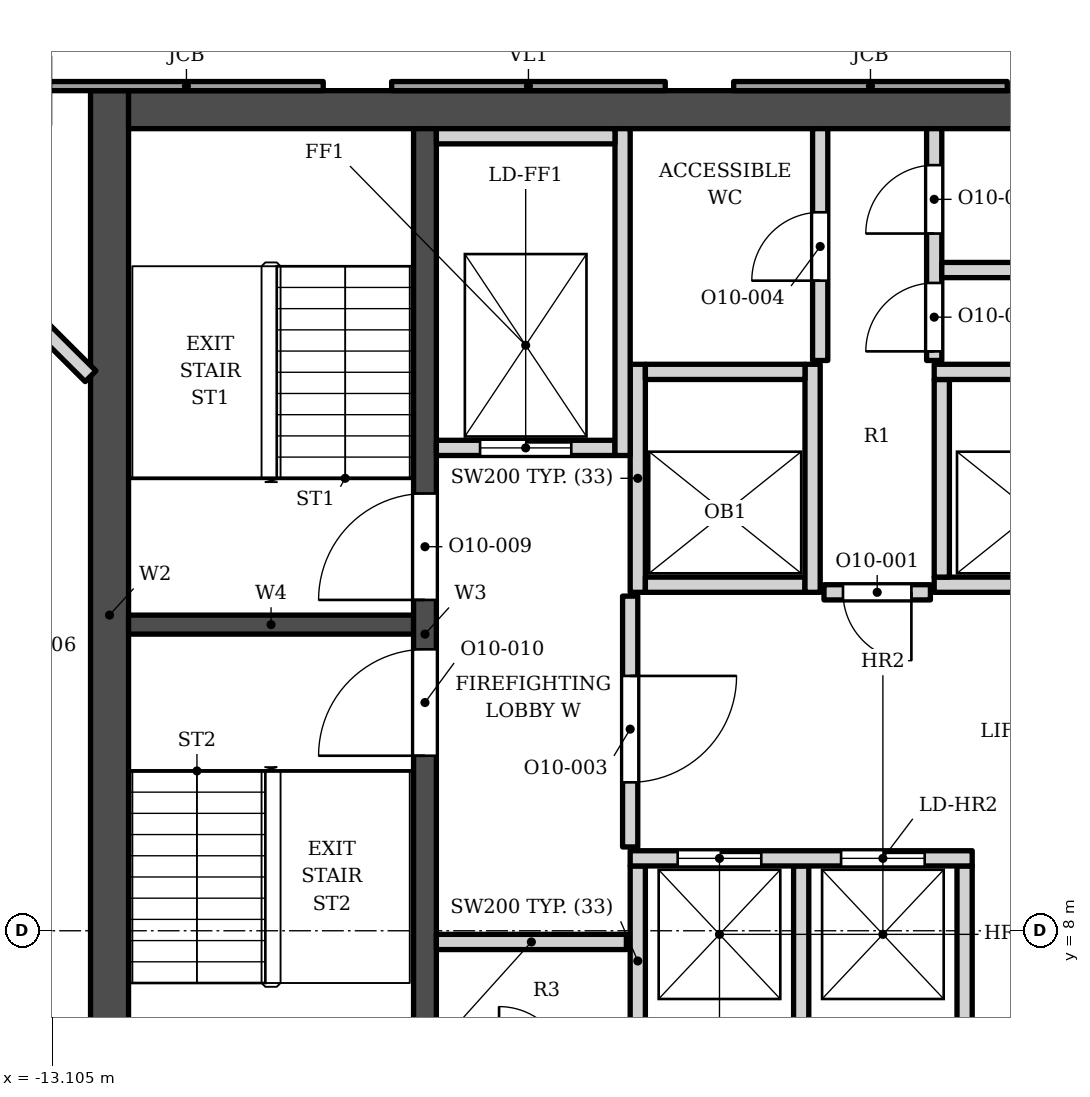
"""IFC4 building model, lengths in metres.
Left out: names, types, materials, properties, quantities, classifications, styles, units other than length and angle.
Written with IfcOpenShell. Run it as: python <this file> out.ifc"""

import sys

from ifc_helpers import new_model, si_unit, direction, frame, frame_2d, origin, place, context, subcontext, project, spatial, polyline, rectangle, outline, extrude, element, fill, save


model = new_model("IFC4")
c1 = context("Model", 3, precision=1e-05, world=origin(), true_north=direction((0.0, 1.0)))
c2 = subcontext(c1, "Body", "Model", "MODEL_VIEW")
j1 = project(units=[si_unit("LENGTHUNIT", "METRE"), si_unit("PLANEANGLEUNIT", "RADIAN")], contexts=[c1])
p1 = place(None, origin())
s1 = spatial("IfcSite", under=j1, at=p1, CompositionType="ELEMENT")
p2 = place(p1, origin())
s2 = spatial("IfcBuilding", under=s1, at=p2, CompositionType="ELEMENT")
p3 = place(p2, frame((0.0, 0.0, 259.9)))
s3 = spatial("IfcBuildingStorey", under=s2, at=p3, CompositionType="ELEMENT", Elevation=259.9)
p4 = place(p3, frame((-12.1, 18.802, 0.0), z_axis=(0.0, 0.0, 1.0), x_axis=(1.0, 0.0, 0.0)))
e1 = element("IfcWall", 1, at=p4, inside=s3, PredefinedType="SHEAR", context=c2, shape_type="SweptSolid", body=[
    extrude(rectangle(XDim=24.2, YDim=0.5, at=frame_2d((12.1, 0.0))), origin(), (0.0, 0.0, 1.0), 3.9),
])
p5 = place(p3, frame((-12.35, 5.253, 0.0), z_axis=(0.0, 0.0, 1.0), x_axis=(0.0, 1.0, 0.0)))
e2 = element("IfcWall", 2, at=p5, inside=s3, PredefinedType="SHEAR", context=c2, shape_type="SweptSolid", body=[
    extrude(rectangle(XDim=13.8, YDim=0.5, at=frame_2d((6.9, 0.0))), origin(), (0.0, 0.0, 1.0), 3.9),
])
p6 = place(p3, frame((-8.2, 5.253, 0.0), z_axis=(0.0, 0.0, 1.0), x_axis=(0.0, 1.0, 0.0)))
e3 = element("IfcWall", 3, at=p6, inside=s3, PredefinedType="SHEAR", context=c2, shape_type="SweptSolid", body=[
    extrude(rectangle(XDim=13.3, YDim=0.3, at=frame_2d((6.65, 0.0))), origin(), (0.0, 0.0, 1.0), 3.9),
])
p7 = place(p6, frame((7.1, 0.0, 0.0)))
e4 = element("IfcOpeningElement", 4, at=p7, cuts=e3, PredefinedType="OPENING", context=c2, shape_type="SweptSolid", body=[
    extrude(rectangle(XDim=1.4, YDim=2.1, at=frame_2d((0.7, 1.05))), frame((0.0, 0.16, 0.0), z_axis=(0.0, -1.0, 0.0), x_axis=(1.0, 0.0, 0.0)), (0.0, 0.0, 1.0), 0.32),
])
p8 = place(p6, frame((5.05, 0.0, 0.0)))
e5 = element("IfcOpeningElement", 5, at=p8, cuts=e3, PredefinedType="OPENING", context=c2, shape_type="SweptSolid", body=[
    extrude(rectangle(XDim=1.4, YDim=2.1, at=frame_2d((0.7, 1.05))), frame((0.0, 0.16, 0.0), z_axis=(0.0, -1.0, 0.0), x_axis=(1.0, 0.0, 0.0)), (0.0, 0.0, 1.0), 0.32),
])
p9 = place(p3, frame((-12.1, 12.028, 0.0), z_axis=(0.0, 0.0, 1.0), x_axis=(1.0, 0.0, 0.0)))
e6 = element("IfcWall", 6, at=p9, inside=s3, PredefinedType="SHEAR", context=c2, shape_type="SweptSolid", body=[
    extrude(rectangle(XDim=3.75, YDim=0.25, at=frame_2d((1.875, 0.0))), origin(), (0.0, 0.0, 1.0), 3.9),
])
p10 = place(p3, origin())
e7 = element("IfcWall", 7, at=p10, inside=s3, PredefinedType="SOLIDWALL", context=c2, shape_type="SweptSolid", body=[
    extrude(outline(polyline([(-4.138, 19.173), (-4.138, 19.052), (-0.539, 19.052), (-0.539, 19.173), (-4.138, 19.173)])), origin(), (0.0, 0.0, 1.0), 3.0),
])
p11 = place(p3, origin())
e8 = element("IfcWall", 8, at=p11, inside=s3, PredefinedType="ELEMENTEDWALL", context=c2, shape_type="SweptSolid", body=[
    extrude(outline(polyline([(-8.638, 19.173), (-8.638, 19.052), (-5.039, 19.052), (-5.039, 19.173), (-8.638, 19.173)])), origin(), (0.0, 0.0, 1.0), 3.0),
])
p12 = place(p3, origin())
e9 = element("IfcWall", 9, at=p12, inside=s3, PredefinedType="SOLIDWALL", context=c2, shape_type="SweptSolid", body=[
    extrude(outline(polyline([(-13.138, 19.173), (-13.138, 19.052), (-9.539, 19.052), (-9.539, 19.173), (-13.138, 19.173)])), origin(), (0.0, 0.0, 1.0), 3.0),
])
for number, where, z_axis, x_axis in (
    (10, (-5.4, 6.353, 0.0), (0.0, 0.0, 1.0), (0.0, 1.0, 0.0)),
    (11, (-3.25, 6.353, 0.0), (0.0, 0.0, 1.0), (0.0, 1.0, 0.0)),
    (12, (-1.1, 6.353, 0.0), (0.0, 0.0, 1.0), (0.0, 1.0, 0.0)),
    (13, (-8.05, 7.853, 0.0), (0.0, 0.0, 1.0), (1.0, 0.0, 0.0)),
):
    element("IfcWall", number, at=place(p3, frame(where, z_axis=z_axis, x_axis=x_axis)), inside=s3, PredefinedType="SOLIDWALL", context=c2, shape_type="SweptSolid", body=[
        extrude(rectangle(XDim=2.5, YDim=0.2, at=frame_2d((1.25, 0.0))), origin(), (0.0, 0.0, 1.0), 3.73),
    ])
p13 = place(p3, frame((-5.5, 8.953, 0.0), z_axis=(0.0, 0.0, 1.0), x_axis=(1.0, 0.0, 0.0)))
e14 = element("IfcWall", 14, at=p13, inside=s3, PredefinedType="SOLIDWALL", context=c2, shape_type="SweptSolid", body=[
    extrude(rectangle(XDim=4.5, YDim=0.2, at=frame_2d((2.25, 0.0))), origin(), (0.0, 0.0, 1.0), 3.73),
])
p14 = place(p13, frame((0.625, 0.0, 0.0)))
e15 = element("IfcOpeningElement", 15, at=p14, cuts=e14, PredefinedType="OPENING", context=c2, shape_type="SweptSolid", body=[
    extrude(rectangle(XDim=1.1, YDim=2.1, at=frame_2d((0.55, 1.05))), frame((0.0, 0.11, 0.0), z_axis=(0.0, -1.0, 0.0), x_axis=(1.0, 0.0, 0.0)), (0.0, 0.0, 1.0), 0.22),
])
p15 = place(p13, frame((2.775, 0.0, 0.0)))
e16 = element("IfcOpeningElement", 16, at=p15, cuts=e14, PredefinedType="OPENING", context=c2, shape_type="SweptSolid", body=[
    extrude(rectangle(XDim=1.1, YDim=2.1, at=frame_2d((0.55, 1.05))), frame((0.0, 0.11, 0.0), z_axis=(0.0, -1.0, 0.0), x_axis=(1.0, 0.0, 0.0)), (0.0, 0.0, 1.0), 0.22),
])
p16 = place(p3, frame((-5.5, 9.103, 0.0), z_axis=(0.0, 0.0, 1.0), x_axis=(0.0, 1.0, 0.0)))
e17 = element("IfcWall", 17, at=p16, inside=s3, PredefinedType="SOLIDWALL", context=c2, shape_type="SweptSolid", body=[
    extrude(rectangle(XDim=3.3, YDim=0.2, at=frame_2d((1.65, 0.0))), origin(), (0.0, 0.0, 1.0), 3.73),
])
p17 = place(p16, frame((0.85, 0.0, 0.0)))
e18 = element("IfcOpeningElement", 18, at=p17, cuts=e17, PredefinedType="OPENING", context=c2, shape_type="SweptSolid", body=[
    extrude(rectangle(XDim=1.4, YDim=2.1, at=frame_2d((0.7, 1.05))), frame((0.0, 0.11, 0.0), z_axis=(0.0, -1.0, 0.0), x_axis=(1.0, 0.0, 0.0)), (0.0, 0.0, 1.0), 0.22),
])
p18 = place(p3, frame((-2.95, 12.453, 0.0), z_axis=(0.0, 0.0, 1.0), x_axis=(1.0, 0.0, 0.0)))
e19 = element("IfcWall", 19, at=p18, inside=s3, PredefinedType="SOLIDWALL", context=c2, shape_type="SweptSolid", body=[
    extrude(rectangle(XDim=1.4, YDim=0.2, at=frame_2d((0.7, 0.0))), origin(), (0.0, 0.0, 1.0), 3.73),
])
p19 = place(p18, frame((0.25, 0.0, 0.0)))
e20 = element("IfcOpeningElement", 20, at=p19, cuts=e19, PredefinedType="OPENING", context=c2, shape_type="SweptSolid", body=[
    extrude(rectangle(XDim=0.9, YDim=2.1, at=frame_2d((0.45, 1.05))), frame((0.0, 0.11, 0.0), z_axis=(0.0, -1.0, 0.0), x_axis=(1.0, 0.0, 0.0)), (0.0, 0.0, 1.0), 0.22),
])
p20 = place(p3, frame((-5.4, 12.453, 0.0), z_axis=(0.0, 0.0, 1.0), x_axis=(0.0, 1.0, 0.0)))
e21 = element("IfcWall", 21, at=p20, inside=s3, PredefinedType="SOLIDWALL", context=c2, shape_type="SweptSolid", body=[
    extrude(rectangle(XDim=3.0, YDim=0.2, at=frame_2d((1.5, 0.0))), origin(), (0.0, 0.0, 1.0), 3.73),
])
p21 = place(p3, frame((-5.3, 12.552, 0.0), z_axis=(0.0, 0.0, 1.0), x_axis=(1.0, 0.0, 0.0)))
e22 = element("IfcWall", 22, at=p21, inside=s3, PredefinedType="SOLIDWALL", context=c2, shape_type="SweptSolid", body=[
    extrude(rectangle(XDim=2.1, YDim=0.2, at=frame_2d((1.05, 0.0))), origin(), (0.0, 0.0, 1.0), 3.73),
])
p22 = place(p3, frame((-3.1, 12.453, 0.0), z_axis=(0.0, 0.0, 1.0), x_axis=(0.0, 1.0, 0.0)))
e23 = element("IfcWall", 23, at=p22, inside=s3, PredefinedType="SOLIDWALL", context=c2, shape_type="SweptSolid", body=[
    extrude(rectangle(XDim=3.0, YDim=0.2, at=frame_2d((1.5, 0.0))), origin(), (0.0, 0.0, 1.0), 3.73),
])
p23 = place(p3, frame((-1.5, 12.552, 0.0), z_axis=(0.0, 0.0, 1.0), x_axis=(1.0, 0.0, 0.0)))
e24 = element("IfcWall", 24, at=p23, inside=s3, PredefinedType="SOLIDWALL", context=c2, shape_type="SweptSolid", body=[
    extrude(rectangle(XDim=7.0, YDim=0.2, at=frame_2d((3.5, 0.0))), origin(), (0.0, 0.0, 1.0), 3.73),
])
p24 = place(p23, frame((3.075, 0.0, 0.0)))
e25 = element("IfcOpeningElement", 25, at=p24, cuts=e24, PredefinedType="OPENING", context=c2, shape_type="SweptSolid", body=[
    extrude(rectangle(XDim=1.1, YDim=2.1, at=frame_2d((0.55, 1.05))), frame((0.0, 0.11, 0.0), z_axis=(0.0, -1.0, 0.0), x_axis=(1.0, 0.0, 0.0)), (0.0, 0.0, 1.0), 0.22),
])
p25 = place(p23, frame((5.275, 0.0, 0.0)))
e26 = element("IfcOpeningElement", 26, at=p25, cuts=e24, PredefinedType="OPENING", context=c2, shape_type="SweptSolid", body=[
    extrude(rectangle(XDim=1.1, YDim=2.1, at=frame_2d((0.55, 1.05))), frame((0.0, 0.11, 0.0), z_axis=(0.0, -1.0, 0.0), x_axis=(1.0, 0.0, 0.0)), (0.0, 0.0, 1.0), 0.22),
])
p26 = place(p3, frame((-1.4, 12.653, 0.0), z_axis=(0.0, 0.0, 1.0), x_axis=(0.0, 1.0, 0.0)))
e27 = element("IfcWall", 27, at=p26, inside=s3, PredefinedType="SOLIDWALL", context=c2, shape_type="SweptSolid", body=[
    extrude(rectangle(XDim=2.6, YDim=0.2, at=frame_2d((1.3, 0.0))), origin(), (0.0, 0.0, 1.0), 3.73),
])
p27 = place(p3, frame((-8.05, 14.353, 0.0), z_axis=(0.0, 0.0, 1.0), x_axis=(1.0, 0.0, 0.0)))
e28 = element("IfcWall", 28, at=p27, inside=s3, PredefinedType="SOLIDWALL", context=c2, shape_type="SweptSolid", body=[
    extrude(rectangle(XDim=2.35, YDim=0.2, at=frame_2d((1.175, 0.0))), origin(), (0.0, 0.0, 1.0), 3.73),
])
p28 = place(p27, frame((0.575, 0.0, 0.0)))
e29 = element("IfcOpeningElement", 29, at=p28, cuts=e28, PredefinedType="OPENING", context=c2, shape_type="SweptSolid", body=[
    extrude(rectangle(XDim=1.2, YDim=2.1, at=frame_2d((0.6, 1.05))), frame((0.0, 0.11, 0.0), z_axis=(0.0, -1.0, 0.0), x_axis=(1.0, 0.0, 0.0)), (0.0, 0.0, 1.0), 0.22),
])
p29 = place(p3, frame((-5.6, 14.253, 0.0), z_axis=(0.0, 0.0, 1.0), x_axis=(0.0, 1.0, 0.0)))
e30 = element("IfcWall", 30, at=p29, inside=s3, PredefinedType="SOLIDWALL", context=c2, shape_type="SweptSolid", body=[
    extrude(rectangle(XDim=4.3, YDim=0.2, at=frame_2d((2.15, 0.0))), origin(), (0.0, 0.0, 1.0), 3.73),
])
p30 = place(p3, frame((-5.3, 15.353, 0.0), z_axis=(0.0, 0.0, 1.0), x_axis=(1.0, 0.0, 0.0)))
e31 = element("IfcWall", 31, at=p30, inside=s3, PredefinedType="SOLIDWALL", context=c2, shape_type="SweptSolid", body=[
    extrude(rectangle(XDim=2.1, YDim=0.2, at=frame_2d((1.05, 0.0))), origin(), (0.0, 0.0, 1.0), 3.73),
])
p31 = place(p3, frame((-1.5, 15.353, 0.0), z_axis=(0.0, 0.0, 1.0), x_axis=(1.0, 0.0, 0.0)))
e32 = element("IfcWall", 32, at=p31, inside=s3, PredefinedType="SOLIDWALL", context=c2, shape_type="SweptSolid", body=[
    extrude(rectangle(XDim=7.2, YDim=0.2, at=frame_2d((3.6, 0.0))), origin(), (0.0, 0.0, 1.0), 3.73),
])
p32 = place(p3, frame((-3.0, 15.503, 0.0), z_axis=(0.0, 0.0, 1.0), x_axis=(0.0, 1.0, 0.0)))
e33 = element("IfcWall", 33, at=p32, inside=s3, PredefinedType="SOLIDWALL", context=c2, shape_type="SweptSolid", body=[
    extrude(rectangle(XDim=3.05, YDim=0.2, at=frame_2d((1.525, 0.0))), origin(), (0.0, 0.0, 1.0), 3.73),
])
p33 = place(p32, frame((1.05, 0.0, 0.0)))
e34 = element("IfcOpeningElement", 34, at=p33, cuts=e33, PredefinedType="OPENING", context=c2, shape_type="SweptSolid", body=[
    extrude(rectangle(XDim=0.9, YDim=2.1, at=frame_2d((0.45, 1.05))), frame((0.0, 0.11, 0.0), z_axis=(0.0, -1.0, 0.0), x_axis=(1.0, 0.0, 0.0)), (0.0, 0.0, 1.0), 0.22),
])
p34 = place(p3, frame((-1.5, 15.503, 0.0), z_axis=(0.0, 0.0, 1.0), x_axis=(0.0, 1.0, 0.0)))
e35 = element("IfcWall", 35, at=p34, inside=s3, PredefinedType="SOLIDWALL", context=c2, shape_type="SweptSolid", body=[
    extrude(rectangle(XDim=3.05, YDim=0.2, at=frame_2d((1.525, 0.0))), origin(), (0.0, 0.0, 1.0), 3.73),
])
p35 = place(p34, frame((0.12, 0.0, 0.0)))
e36 = element("IfcOpeningElement", 36, at=p35, cuts=e35, PredefinedType="OPENING", context=c2, shape_type="SweptSolid", body=[
    extrude(rectangle(XDim=0.9, YDim=2.1, at=frame_2d((0.45, 1.05))), frame((0.0, 0.11, 0.0), z_axis=(0.0, -1.0, 0.0), x_axis=(1.0, 0.0, 0.0)), (0.0, 0.0, 1.0), 0.22),
])
p36 = place(p34, frame((1.67, 0.0, 0.0)))
e37 = element("IfcOpeningElement", 37, at=p36, cuts=e35, PredefinedType="OPENING", context=c2, shape_type="SweptSolid", body=[
    extrude(rectangle(XDim=0.9, YDim=2.1, at=frame_2d((0.45, 1.05))), frame((0.0, 0.11, 0.0), z_axis=(0.0, -1.0, 0.0), x_axis=(1.0, 0.0, 0.0)), (0.0, 0.0, 1.0), 0.22),
])
p37 = place(p3, frame((-1.4, 16.693, 0.0), z_axis=(0.0, 0.0, 1.0), x_axis=(1.0, 0.0, 0.0)))
e38 = element("IfcWall", 38, at=p37, inside=s3, PredefinedType="SOLIDWALL", context=c2, shape_type="SweptSolid", body=[
    extrude(rectangle(XDim=6.85, YDim=0.2, at=frame_2d((3.425, 0.0))), origin(), (0.0, 0.0, 1.0), 3.73),
])
p38 = place(p3, frame((-8.05, 18.453, 0.0), z_axis=(0.0, 0.0, 1.0), x_axis=(1.0, 0.0, 0.0)))
e39 = element("IfcWall", 39, at=p38, inside=s3, PredefinedType="SOLIDWALL", context=c2, shape_type="SweptSolid", body=[
    extrude(rectangle(XDim=2.35, YDim=0.2, at=frame_2d((1.175, 0.0))), origin(), (0.0, 0.0, 1.0), 3.73),
])
p39 = place(p3, frame((-13.26, 15.953, 0.0), z_axis=(0.0, 0.0, 1.0), x_axis=(0.708285399161, -0.705926195389, 0.0)))
e40 = element("IfcWall", 40, at=p39, inside=s3, PredefinedType="PARTITIONING", context=c2, shape_type="SweptSolid", body=[
    extrude(rectangle(XDim=0.931, YDim=0.2, at=frame_2d((0.466, 0.0))), origin(), (0.0, 0.0, 1.0), 3.73),
])
p40 = place(p14, origin())
e41 = element("IfcDoor", 41, at=p40, inside=s3, OperationType="DOUBLE_DOOR_SLIDING", PredefinedType="DOOR", context=c2, shape_type="SweptSolid", body=[
    extrude(rectangle(XDim=1.1, YDim=2.1, at=frame_2d((0.55, 1.05))), frame((0.0, 0.025, 0.0), z_axis=(0.0, -1.0, 0.0), x_axis=(1.0, 0.0, 0.0)), (0.0, 0.0, 1.0), 0.05),
])
fill(e15, e41)
p41 = place(p15, origin())
e42 = element("IfcDoor", 42, at=p41, inside=s3, OperationType="DOUBLE_DOOR_SLIDING", PredefinedType="DOOR", context=c2, shape_type="SweptSolid", body=[
    extrude(rectangle(XDim=1.1, YDim=2.1, at=frame_2d((0.55, 1.05))), frame((0.0, 0.025, 0.0), z_axis=(0.0, -1.0, 0.0), x_axis=(1.0, 0.0, 0.0)), (0.0, 0.0, 1.0), 0.05),
])
fill(e16, e42)
p42 = place(p28, origin())
e43 = element("IfcDoor", 43, at=p42, inside=s3, OperationType="DOUBLE_DOOR_SLIDING", PredefinedType="DOOR", context=c2, shape_type="SweptSolid", body=[
    extrude(rectangle(XDim=1.2, YDim=2.1, at=frame_2d((0.6, 1.05))), frame((0.0, 0.025, 0.0), z_axis=(0.0, -1.0, 0.0), x_axis=(1.0, 0.0, 0.0)), (0.0, 0.0, 1.0), 0.05),
])
fill(e29, e43)
p43 = place(p7, origin())
e44 = element("IfcDoor", 44, at=p43, inside=s3, OperationType="SINGLE_SWING_LEFT", PredefinedType="DOOR", context=c2, shape_type="SweptSolid", body=[
    extrude(rectangle(XDim=1.4, YDim=2.1, at=frame_2d((0.7, 1.05))), frame((0.0, 0.025, 0.0), z_axis=(0.0, -1.0, 0.0), x_axis=(1.0, 0.0, 0.0)), (0.0, 0.0, 1.0), 0.05),
])
fill(e4, e44)
p44 = place(p8, origin())
e45 = element("IfcDoor", 45, at=p44, inside=s3, OperationType="SINGLE_SWING_LEFT", PredefinedType="DOOR", context=c2, shape_type="SweptSolid", body=[
    extrude(rectangle(XDim=1.4, YDim=2.1, at=frame_2d((0.7, 1.05))), frame((0.0, 0.025, 0.0), z_axis=(0.0, -1.0, 0.0), x_axis=(1.0, 0.0, 0.0)), (0.0, 0.0, 1.0), 0.05),
])
fill(e5, e45)
p45 = place(p19, origin())
e46 = element("IfcDoor", 46, at=p45, inside=s3, OperationType="SINGLE_SWING_RIGHT", PredefinedType="DOOR", context=c2, shape_type="SweptSolid", body=[
    extrude(rectangle(XDim=0.9, YDim=2.1, at=frame_2d((0.45, 1.05))), frame((0.0, 0.025, 0.0), z_axis=(0.0, -1.0, 0.0), x_axis=(1.0, 0.0, 0.0)), (0.0, 0.0, 1.0), 0.05),
])
fill(e20, e46)
p46 = place(p17, origin())
e47 = element("IfcDoor", 47, at=p46, inside=s3, OperationType="SINGLE_SWING_RIGHT", PredefinedType="DOOR", context=c2, shape_type="SweptSolid", body=[
    extrude(rectangle(XDim=1.4, YDim=2.1, at=frame_2d((0.7, 1.05))), frame((0.0, 0.025, 0.0), z_axis=(0.0, -1.0, 0.0), x_axis=(1.0, 0.0, 0.0)), (0.0, 0.0, 1.0), 0.05),
])
fill(e18, e47)
p47 = place(p33, origin())
e48 = element("IfcDoor", 48, at=p47, inside=s3, OperationType="SINGLE_SWING_LEFT", PredefinedType="DOOR", context=c2, shape_type="SweptSolid", body=[
    extrude(rectangle(XDim=0.9, YDim=2.1, at=frame_2d((0.45, 1.05))), frame((0.0, 0.025, 0.0), z_axis=(0.0, -1.0, 0.0), x_axis=(1.0, 0.0, 0.0)), (0.0, 0.0, 1.0), 0.05),
])
fill(e34, e48)
p48 = place(p35, origin())
e49 = element("IfcDoor", 49, at=p48, inside=s3, OperationType="SINGLE_SWING_LEFT", PredefinedType="DOOR", context=c2, shape_type="SweptSolid", body=[
    extrude(rectangle(XDim=0.9, YDim=2.1, at=frame_2d((0.45, 1.05))), frame((0.0, 0.025, 0.0), z_axis=(0.0, -1.0, 0.0), x_axis=(1.0, 0.0, 0.0)), (0.0, 0.0, 1.0), 0.05),
])
fill(e36, e49)
p49 = place(p36, origin())
e50 = element("IfcDoor", 50, at=p49, inside=s3, OperationType="SINGLE_SWING_LEFT", PredefinedType="DOOR", context=c2, shape_type="SweptSolid", body=[
    extrude(rectangle(XDim=0.9, YDim=2.1, at=frame_2d((0.45, 1.05))), frame((0.0, 0.025, 0.0), z_axis=(0.0, -1.0, 0.0), x_axis=(1.0, 0.0, 0.0)), (0.0, 0.0, 1.0), 0.05),
])
fill(e37, e50)
save(model, sys.argv[1])
